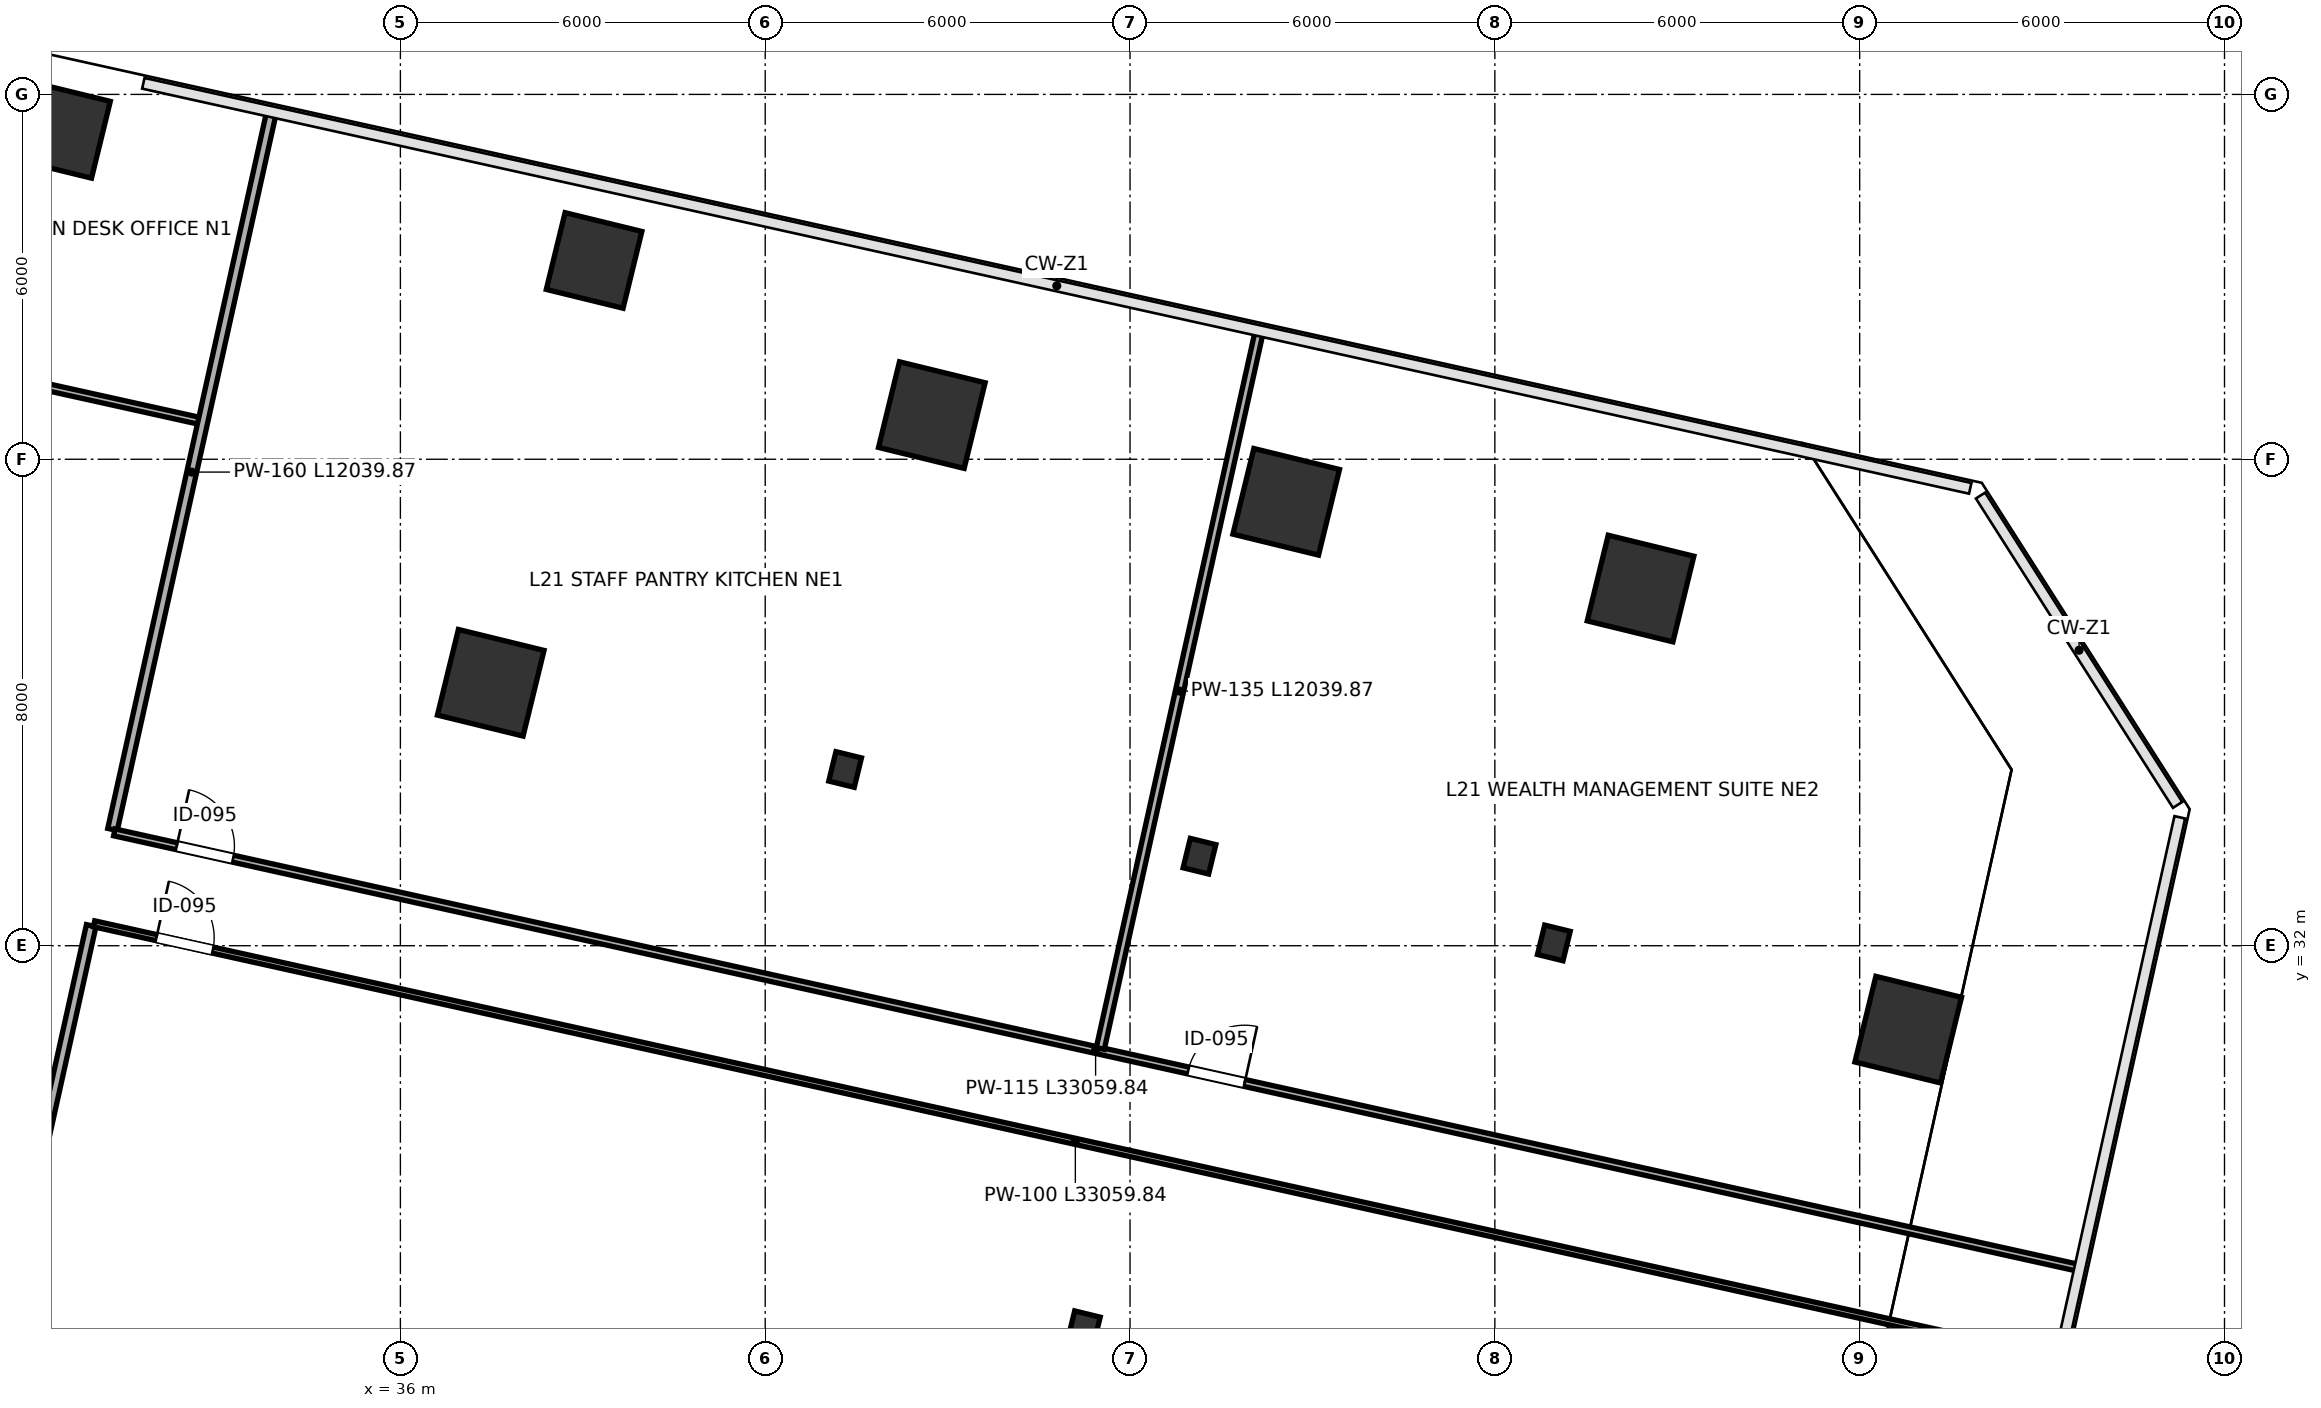
"""IFC4 building model, lengths in metres.
Left out: names, types, materials, properties, quantities, classifications, styles, units other than length and angle.
Written with IfcOpenShell. Run it as: python <this file> out.ifc"""

import sys

from ifc_helpers import new_model, si_unit, direction, frame, frame_2d, origin, origin_2d, place, context, subcontext, project, spatial, rectangle, i_section, extrude, clip, halfspace, source, transform, mapped, element, fill, save


model = new_model("IFC4")
c1 = context("Model", 3, precision=1e-05, world=origin(), true_north=direction((0.0, 1.0)))
c2 = subcontext(c1, "Body", "Model", "MODEL_VIEW")
j1 = project(units=[si_unit("LENGTHUNIT", "METRE"), si_unit("PLANEANGLEUNIT", "RADIAN")], contexts=[c1])
p1 = place(None, origin())
s1 = spatial("IfcSite", under=j1, at=p1, CompositionType="ELEMENT")
p2 = place(p1, origin())
s2 = spatial("IfcBuilding", under=s1, at=p2, CompositionType="ELEMENT")
p3 = place(p2, frame((0.0, 0.0, 95.8)))
s3 = spatial("IfcBuildingStorey", under=s2, at=p3, CompositionType="ELEMENT", Elevation=95.8)
p4 = place(p3, frame((30.443, 45.409, 0.0), z_axis=(0.068874852262, -0.047094411177, 0.996513106367), x_axis=(-0.743779680485, -0.66813059545, 0.01983164948)))
e1 = element("IfcColumn", 1, at=p4, inside=s3, PredefinedType="COLUMN", context=c2, shape_type="Clipping", body=[
    clip(clip(extrude(rectangle(XDim=1.3, YDim=1.3, at=origin_2d()), origin(), (0.0, 0.0, 1.0), 4.215), halfspace(frame((0.0, 0.0, 0.067), z_axis=(0.0, 0.0, -1.0), x_axis=(1.0, 0.0, 0.0)), False)), halfspace(frame((0.0, 0.0, 4.148), z_axis=(0.0, 0.0, 1.0), x_axis=(1.0, 0.0, 0.0)), False)),
])
p5 = place(p3, frame((37.486, 36.324, 0.0), z_axis=(0.021486713644, -0.082935239724, 0.996323274419), x_axis=(-0.999689409814, -0.014367235525, 0.020363360447)))
e2 = element("IfcColumn", 2, at=p5, inside=s3, PredefinedType="COLUMN", context=c2, shape_type="Clipping", body=[
    clip(clip(extrude(rectangle(XDim=1.45, YDim=1.45, at=origin_2d()), origin(), (0.0, 0.0, 1.0), 4.215), halfspace(frame((0.0, 0.0, 0.076), z_axis=(0.0, 0.0, -1.0), x_axis=(1.0, 0.0, 0.0)), False)), halfspace(frame((0.0, 0.0, 4.139), z_axis=(0.0, 0.0, 1.0), x_axis=(1.0, 0.0, 0.0)), False)),
])
p6 = place(p3, frame((39.185, 43.269, 0.0), z_axis=(0.057209704883, -0.091940040878, 0.994119750609), x_axis=(-0.949549627817, -0.312558879677, 0.025738124395)))
e3 = element("IfcColumn", 3, at=p6, inside=s3, PredefinedType="COLUMN", context=c2, shape_type="Clipping", body=[
    clip(clip(extrude(rectangle(XDim=1.3, YDim=1.3, at=origin_2d()), origin(), (0.0, 0.0, 1.0), 4.225), halfspace(frame((0.0, 0.0, 0.086), z_axis=(0.0, 0.0, -1.0), x_axis=(1.0, 0.0, 0.0)), False)), halfspace(frame((0.0, 0.0, 4.138), z_axis=(0.0, 0.0, 1.0), x_axis=(1.0, 0.0, 0.0)), False)),
])
p7 = place(p3, frame((43.314, 34.898, 0.0), z_axis=(0.013745286172, -0.112734447934, 0.993530075718), x_axis=(-0.992782582897, 0.116850659395, 0.026993823279)))
e4 = element("IfcColumn", 4, at=p7, inside=s3, PredefinedType="COLUMN", context=c2, shape_type="Clipping", body=[
    clip(clip(extrude(i_section(OverallWidth=0.432, OverallDepth=0.498, WebThickness=0.056, FlangeThickness=0.089, FilletRadius=0.015, at=origin_2d()), origin(), (0.0, 0.0, 1.0), 4.227), halfspace(frame((0.0, 0.0, 0.034), z_axis=(0.0, 0.0, -1.0), x_axis=(1.0, 0.0, 0.0)), False)), halfspace(frame((0.0, 0.0, 4.193), z_axis=(0.0, 0.0, 1.0), x_axis=(1.0, 0.0, 0.0)), False)),
])
p8 = place(p3, frame((44.74, 40.726, 0.0), z_axis=(0.043642652693, -0.120204664286, 0.991789371565), x_axis=(-0.99347662325, -0.109910397772, 0.030395781227)))
e5 = element("IfcColumn", 5, at=p8, inside=s3, PredefinedType="COLUMN", context=c2, shape_type="Clipping", body=[
    clip(clip(extrude(rectangle(XDim=1.45, YDim=1.45, at=origin_2d()), origin(), (0.0, 0.0, 1.0), 4.235), halfspace(frame((0.0, 0.0, 0.114), z_axis=(0.0, 0.0, -1.0), x_axis=(1.0, 0.0, 0.0)), False)), halfspace(frame((0.0, 0.0, 4.121), z_axis=(0.0, 0.0, 1.0), x_axis=(1.0, 0.0, 0.0)), False)),
])
p9 = place(p3, frame((47.24, 25.701, 0.0), z_axis=(-0.033860756717, -0.132103020252, 0.99065747925), x_axis=(-0.882459563694, 0.469270120304, 0.03241408083)))
e6 = element("IfcColumn", 6, at=p9, inside=s3, PredefinedType="COLUMN", context=c2, shape_type="Clipping", body=[
    clip(clip(extrude(i_section(OverallWidth=0.432, OverallDepth=0.498, WebThickness=0.056, FlangeThickness=0.089, FilletRadius=0.015, at=origin_2d()), origin(), (0.0, 0.0, 1.0), 4.24), halfspace(frame((0.0, 0.0, 0.041), z_axis=(0.0, 0.0, -1.0), x_axis=(1.0, 0.0, 0.0)), False)), halfspace(frame((0.0, 0.0, 4.198), z_axis=(0.0, 0.0, 1.0), x_axis=(1.0, 0.0, 0.0)), False)),
])
p10 = place(p3, frame((49.142, 33.472, 0.0), z_axis=(0.005983885477, -0.142232354801, 0.98981521021), x_axis=(-0.980372715523, 0.194227773312, 0.033836529561)))
e7 = element("IfcColumn", 7, at=p10, inside=s3, PredefinedType="COLUMN", context=c2, shape_type="Clipping", body=[
    clip(clip(extrude(i_section(OverallWidth=0.432, OverallDepth=0.498, WebThickness=0.056, FlangeThickness=0.089, FilletRadius=0.015, at=origin_2d()), origin(), (0.0, 0.0, 1.0), 4.243), halfspace(frame((0.0, 0.0, 0.043), z_axis=(0.0, 0.0, -1.0), x_axis=(1.0, 0.0, 0.0)), False)), halfspace(frame((0.0, 0.0, 4.2), z_axis=(0.0, 0.0, 1.0), x_axis=(1.0, 0.0, 0.0)), False)),
])
p11 = place(p3, frame((50.568, 39.3, 0.0), z_axis=(0.035841157011, -0.149567905219, 0.988101641124), x_axis=(-0.999329508382, 0.002036176133, 0.036556636394)))
e8 = element("IfcColumn", 8, at=p11, inside=s3, PredefinedType="COLUMN", context=c2, shape_type="Clipping", body=[
    clip(clip(extrude(rectangle(XDim=1.45, YDim=1.45, at=origin_2d()), origin(), (0.0, 0.0, 1.0), 4.25), halfspace(frame((0.0, 0.0, 0.137), z_axis=(0.0, 0.0, -1.0), x_axis=(1.0, 0.0, 0.0)), False)), halfspace(frame((0.0, 0.0, 4.113), z_axis=(0.0, 0.0, 1.0), x_axis=(1.0, 0.0, 0.0)), False)),
])
p12 = place(p3, frame((54.97, 32.046, 0.0), z_axis=(-0.001660850625, -0.171239426504, 0.985228044864), x_axis=(-0.969025231854, 0.243584393687, 0.040703110237)))
e9 = element("IfcColumn", 9, at=p12, inside=s3, PredefinedType="COLUMN", context=c2, shape_type="Clipping", body=[
    clip(clip(extrude(i_section(OverallWidth=0.432, OverallDepth=0.498, WebThickness=0.056, FlangeThickness=0.089, FilletRadius=0.015, at=origin_2d()), origin(), (0.0, 0.0, 1.0), 4.263), halfspace(frame((0.0, 0.0, 0.052), z_axis=(0.0, 0.0, -1.0), x_axis=(1.0, 0.0, 0.0)), False)), halfspace(frame((0.0, 0.0, 4.211), z_axis=(0.0, 0.0, 1.0), x_axis=(1.0, 0.0, 0.0)), False)),
])
p13 = place(p3, frame((56.396, 37.874, 0.0), z_axis=(0.028071185812, -0.178603634375, 0.983520589675), x_axis=(-0.995858545745, 0.080119312988, 0.042972695445)))
e10 = element("IfcColumn", 10, at=p13, inside=s3, PredefinedType="COLUMN", context=c2, shape_type="Clipping", body=[
    clip(clip(extrude(rectangle(XDim=1.45, YDim=1.45, at=origin_2d()), origin(), (0.0, 0.0, 1.0), 4.27), halfspace(frame((0.0, 0.0, 0.162), z_axis=(0.0, 0.0, -1.0), x_axis=(1.0, 0.0, 0.0)), False)), halfspace(frame((0.0, 0.0, 4.108), z_axis=(0.0, 0.0, 1.0), x_axis=(1.0, 0.0, 0.0)), False)),
])
p14 = place(p3, frame((60.798, 30.62, 0.0), z_axis=(-0.009169522057, -0.199906971547, 0.979771974794), x_axis=(-0.959651199018, 0.277141019279, 0.047565025555)))
e11 = element("IfcColumn", 11, at=p14, inside=s3, PredefinedType="COLUMN", context=c2, shape_type="Clipping", body=[
    clip(clip(extrude(rectangle(XDim=1.45, YDim=1.45, at=origin_2d()), origin(), (0.0, 0.0, 1.0), 4.287), halfspace(frame((0.0, 0.0, 0.18), z_axis=(0.0, 0.0, -1.0), x_axis=(1.0, 0.0, 0.0)), False)), halfspace(frame((0.0, 0.0, 4.107), z_axis=(0.0, 0.0, 1.0), x_axis=(1.0, 0.0, 0.0)), False)),
])
p15 = place(p3, frame((6.744, 46.385, 0.0), z_axis=(0.0, 0.0, 1.0), x_axis=(0.976297719541, -0.216431889561, 0.0)))
e12 = element("IfcWall", 12, at=p15, inside=s3, PredefinedType="PARTITIONING", context=c2, shape_type="SweptSolid", body=[
    extrude(rectangle(XDim=26.6, YDim=0.115, at=frame_2d((13.3, 0.0))), origin(), (0.0, 0.0, 1.0), 3.96),
])
p16 = place(p15, frame((0.91, 0.0, 0.0)))
e13 = element("IfcOpeningElement", 13, at=p16, cuts=e12, PredefinedType="OPENING", context=c2, shape_type="SweptSolid", body=[
    extrude(rectangle(XDim=0.95, YDim=2.15, at=frame_2d((0.475, 1.075))), frame((0.0, 0.067, 0.0), z_axis=(0.0, -1.0, 0.0), x_axis=(1.0, 0.0, 0.0)), (0.0, 0.0, 1.0), 0.135),
])
p17 = place(p3, frame((31.265, 33.912, 0.0), z_axis=(0.0, 0.0, 1.0), x_axis=(0.216425867349, 0.976299054564, 0.0)))
e14 = element("IfcWall", 14, at=p17, inside=s3, PredefinedType="PARTITIONING", context=c2, shape_type="SweptSolid", body=[
    extrude(rectangle(XDim=12.04, YDim=0.16, at=frame_2d((6.02, 0.0))), origin(), (0.0, 0.0, 1.0), 3.095),
])
p18 = place(p3, frame((26.504, 12.433, 0.0), z_axis=(0.0, 0.0, 1.0), x_axis=(0.216434476574, 0.976297146032, 0.0)))
e15 = element("IfcWall", 15, at=p18, inside=s3, PredefinedType="PARTITIONING", context=c2, shape_type="SweptSolid", body=[
    extrude(rectangle(XDim=20.38, YDim=0.16, at=frame_2d((10.19, 0.0))), origin(), (0.0, 0.0, 1.0), 3.96),
])
p19 = place(p3, frame((31.296, 33.864, 0.0), z_axis=(0.0, 0.0, 1.0), x_axis=(0.976295884124, -0.216440168738, 0.0)))
e16 = element("IfcWall", 16, at=p19, inside=s3, PredefinedType="PARTITIONING", context=c2, shape_type="SweptSolid", body=[
    extrude(rectangle(XDim=33.06, YDim=0.115, at=frame_2d((16.53, 0.0))), origin(), (0.0, 0.0, 1.0), 3.095),
])
p20 = place(p19, frame((1.05, 0.0, 0.0)))
e17 = element("IfcOpeningElement", 17, at=p20, cuts=e16, PredefinedType="OPENING", context=c2, shape_type="SweptSolid", body=[
    extrude(rectangle(XDim=0.95, YDim=2.15, at=frame_2d((0.475, 1.075))), frame((0.0, 0.067, 0.0), z_axis=(0.0, -1.0, 0.0), x_axis=(1.0, 0.0, 0.0)), (0.0, 0.0, 1.0), 0.135),
])
p21 = place(p19, frame((18.09, 0.0, 0.0)))
e18 = element("IfcOpeningElement", 18, at=p21, cuts=e16, PredefinedType="OPENING", context=c2, shape_type="SweptSolid", body=[
    extrude(rectangle(XDim=0.95, YDim=2.15, at=frame_2d((0.475, 1.075))), frame((0.0, 0.067, 0.0), z_axis=(0.0, -1.0, 0.0), x_axis=(1.0, 0.0, 0.0)), (0.0, 0.0, 1.0), 0.135),
])
p22 = place(p3, frame((30.962, 32.361, 0.0), z_axis=(0.0, 0.0, 1.0), x_axis=(0.976295538171, -0.216441729221, 0.0)))
e19 = element("IfcWall", 19, at=p22, inside=s3, PredefinedType="PARTITIONING", context=c2, shape_type="SweptSolid", body=[
    extrude(rectangle(XDim=33.06, YDim=0.1, at=frame_2d((16.53, 0.0))), origin(), (0.0, 0.0, 1.0), 3.095),
])
p23 = place(p22, frame((1.05, 0.0, 0.0)))
e20 = element("IfcOpeningElement", 20, at=p23, cuts=e19, PredefinedType="OPENING", context=c2, shape_type="SweptSolid", body=[
    extrude(rectangle(XDim=0.95, YDim=2.15, at=frame_2d((0.475, 1.075))), frame((0.0, 0.06, 0.0), z_axis=(0.0, -1.0, 0.0), x_axis=(1.0, 0.0, 0.0)), (0.0, 0.0, 1.0), 0.12),
])
p24 = place(p3, frame((47.511, 30.31, 0.0), z_axis=(0.0, 0.0, 1.0), x_axis=(0.216425867349, 0.976299054564, 0.0)))
e21 = element("IfcWall", 21, at=p24, inside=s3, PredefinedType="PARTITIONING", context=c2, shape_type="SweptSolid", body=[
    extrude(rectangle(XDim=12.04, YDim=0.135, at=frame_2d((6.02, 0.0))), origin(), (0.0, 0.0, 1.0), 3.323),
])
m1 = source(origin(), c2, "Body", "SweptSolid", [
    extrude(rectangle(XDim=0.95, YDim=2.15, at=frame_2d((0.475, 1.075))), frame((0.0, 0.025, 0.0), z_axis=(0.0, -1.0, 0.0), x_axis=(1.0, 0.0, 0.0)), (0.0, 0.0, 1.0), 0.05),
])
p25 = place(p20, origin())
e22 = element("IfcDoor", 22, at=p25, inside=s3, OperationType="SINGLE_SWING_LEFT", PredefinedType="DOOR", context=c2, shape_type="MappedRepresentation", body=[
    mapped(m1, transform((0.0, 0.0, 0.0), scale=1.0)),
])
fill(e17, e22)
p26 = place(p21, origin())
e23 = element("IfcDoor", 23, at=p26, inside=s3, OperationType="SINGLE_SWING_RIGHT", PredefinedType="DOOR", context=c2, shape_type="MappedRepresentation", body=[
    mapped(m1, transform((0.0, 0.0, 0.0), scale=1.0)),
])
fill(e18, e23)
p27 = place(p23, origin())
e24 = element("IfcDoor", 24, at=p27, inside=s3, OperationType="SINGLE_SWING_LEFT", PredefinedType="DOOR", context=c2, shape_type="MappedRepresentation", body=[
    mapped(m1, transform((0.0, 0.0, 0.0), scale=1.0)),
])
fill(e20, e24)
save(model, sys.argv[1])
